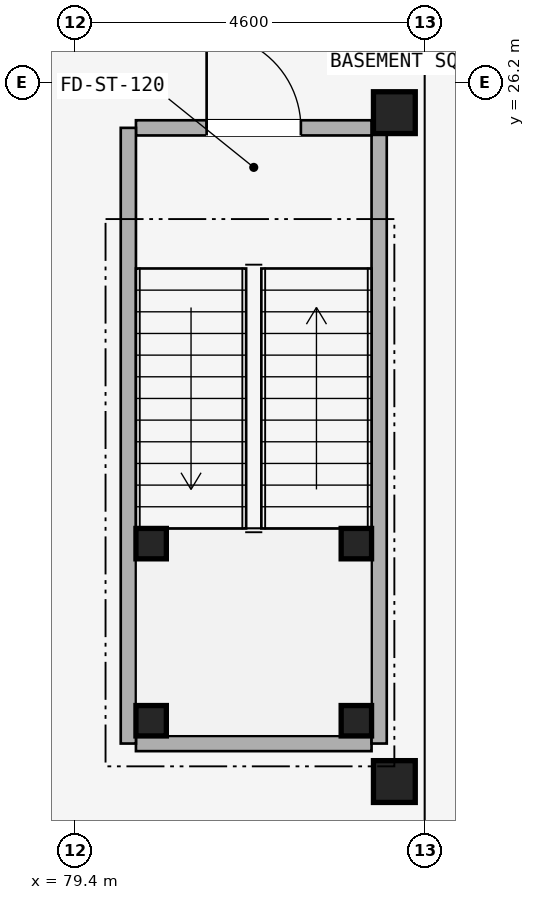
"""IFC4 building model, lengths in metres.
Left out: names, types, materials, properties, quantities, classifications, styles, units other than length and angle.
Written with IfcOpenShell. Run it as: python <this file> out.ifc"""

import sys

from ifc_helpers import new_model, si_unit, direction, frame, frame_2d, origin, origin_2d, place, context, subcontext, project, spatial, rectangle, extrude, element, fill, save


model = new_model("IFC4")
c1 = context("Model", 3, precision=1e-05, world=origin(), true_north=direction((0.0, 1.0)))
c2 = subcontext(c1, "Body", "Model", "MODEL_VIEW")
j1 = project(units=[si_unit("LENGTHUNIT", "METRE"), si_unit("PLANEANGLEUNIT", "RADIAN")], contexts=[c1])
p1 = place(None, origin())
s1 = spatial("IfcSite", under=j1, at=p1, CompositionType="ELEMENT")
p2 = place(p1, origin())
s2 = spatial("IfcBuilding", under=s1, at=p2, CompositionType="ELEMENT")
p3 = place(p2, frame((0.0, 0.0, -4.5)))
s3 = spatial("IfcBuildingStorey", under=s2, at=p3, CompositionType="ELEMENT", Elevation=-4.5)
for number, where, z_axis, x_axis in (
    (1, (83.6, 17.0, -0.5), (0.0, 0.0, 1.0), (1.0, 0.0, 0.0)),
    (2, (83.6, 25.8, -0.5), (0.0, 0.0, 1.0), (1.0, 0.0, 0.0)),
):
    element("IfcColumn", number, at=place(p3, frame(where, z_axis=z_axis, x_axis=x_axis)), inside=s3, PredefinedType="COLUMN", context=c2, shape_type="SweptSolid", body=[
        extrude(rectangle(XDim=0.55, YDim=0.55, at=origin_2d()), origin(), (0.0, 0.0, 1.0), 4.7),
    ])
for number, where, z_axis, x_axis in (
    (3, (80.4, 17.8, 0.0), (0.0, 0.0, 1.0), (1.0, 0.0, 0.0)),
    (4, (83.1, 17.8, 0.0), (0.0, 0.0, 1.0), (1.0, 0.0, 0.0)),
    (5, (80.4, 20.13, 0.0), (0.0, 0.0, 1.0), (1.0, 0.0, 0.0)),
    (6, (83.1, 20.13, 0.0), (0.0, 0.0, 1.0), (1.0, 0.0, 0.0)),
):
    element("IfcColumn", number, at=place(p3, frame(where, z_axis=z_axis, x_axis=x_axis)), inside=s3, PredefinedType="COLUMN", context=c2, shape_type="SweptSolid", body=[
        extrude(rectangle(XDim=0.4, YDim=0.4, at=origin_2d()), origin(), (0.0, 0.0, 1.0), 2.05),
    ])
p4 = place(p3, frame((80.2, 17.5, 0.0), z_axis=(0.0, 0.0, 1.0), x_axis=(1.0, 0.0, 0.0)))
e7 = element("IfcWall", 7, at=p4, inside=s3, PredefinedType="STANDARD", context=c2, shape_type="SweptSolid", body=[
    extrude(rectangle(XDim=3.1, YDim=0.2, at=frame_2d((1.55, 0.0))), origin(), (0.0, 0.0, 1.0), 4.18),
])
p5 = place(p3, frame((83.4, 17.5, 0.0), z_axis=(0.0, 0.0, 1.0), x_axis=(0.0, 1.0, 0.0)))
e8 = element("IfcWall", 8, at=p5, inside=s3, PredefinedType="STANDARD", context=c2, shape_type="SweptSolid", body=[
    extrude(rectangle(XDim=8.1, YDim=0.2, at=frame_2d((4.05, 0.0))), origin(), (0.0, 0.0, 1.0), 4.18),
])
p6 = place(p3, frame((80.2, 25.6, 0.0), z_axis=(0.0, 0.0, 1.0), x_axis=(1.0, 0.0, 0.0)))
e9 = element("IfcWall", 9, at=p6, inside=s3, PredefinedType="STANDARD", context=c2, shape_type="SweptSolid", body=[
    extrude(rectangle(XDim=3.1, YDim=0.2, at=frame_2d((1.55, 0.0))), origin(), (0.0, 0.0, 1.0), 4.18),
])
p7 = place(p6, frame((0.93, 0.0, 0.0)))
e10 = element("IfcOpeningElement", 10, at=p7, cuts=e9, PredefinedType="OPENING", context=c2, shape_type="SweptSolid", body=[
    extrude(rectangle(XDim=1.24, YDim=2.15, at=frame_2d((0.62, 1.075))), frame((0.0, 0.11, 0.0), z_axis=(0.0, -1.0, 0.0), x_axis=(1.0, 0.0, 0.0)), (0.0, 0.0, 1.0), 0.22),
])
p8 = place(p3, frame((80.1, 17.5, 0.0), z_axis=(0.0, 0.0, 1.0), x_axis=(0.0, 1.0, 0.0)))
e11 = element("IfcWall", 11, at=p8, inside=s3, PredefinedType="STANDARD", context=c2, shape_type="SweptSolid", body=[
    extrude(rectangle(XDim=8.1, YDim=0.2, at=frame_2d((4.05, 0.0))), origin(), (0.0, 0.0, 1.0), 4.18),
])
p9 = place(p7, origin())
e12 = element("IfcDoor", 12, at=p9, inside=s3, OperationType="SINGLE_SWING_LEFT", PredefinedType="DOOR", context=c2, shape_type="SweptSolid", body=[
    extrude(rectangle(XDim=1.24, YDim=2.15, at=frame_2d((0.62, 1.075))), frame((0.0, 0.025, 0.0), z_axis=(0.0, -1.0, 0.0), x_axis=(1.0, 0.0, 0.0)), (0.0, 0.0, 1.0), 0.05),
])
fill(e10, e12)
save(model, sys.argv[1])
